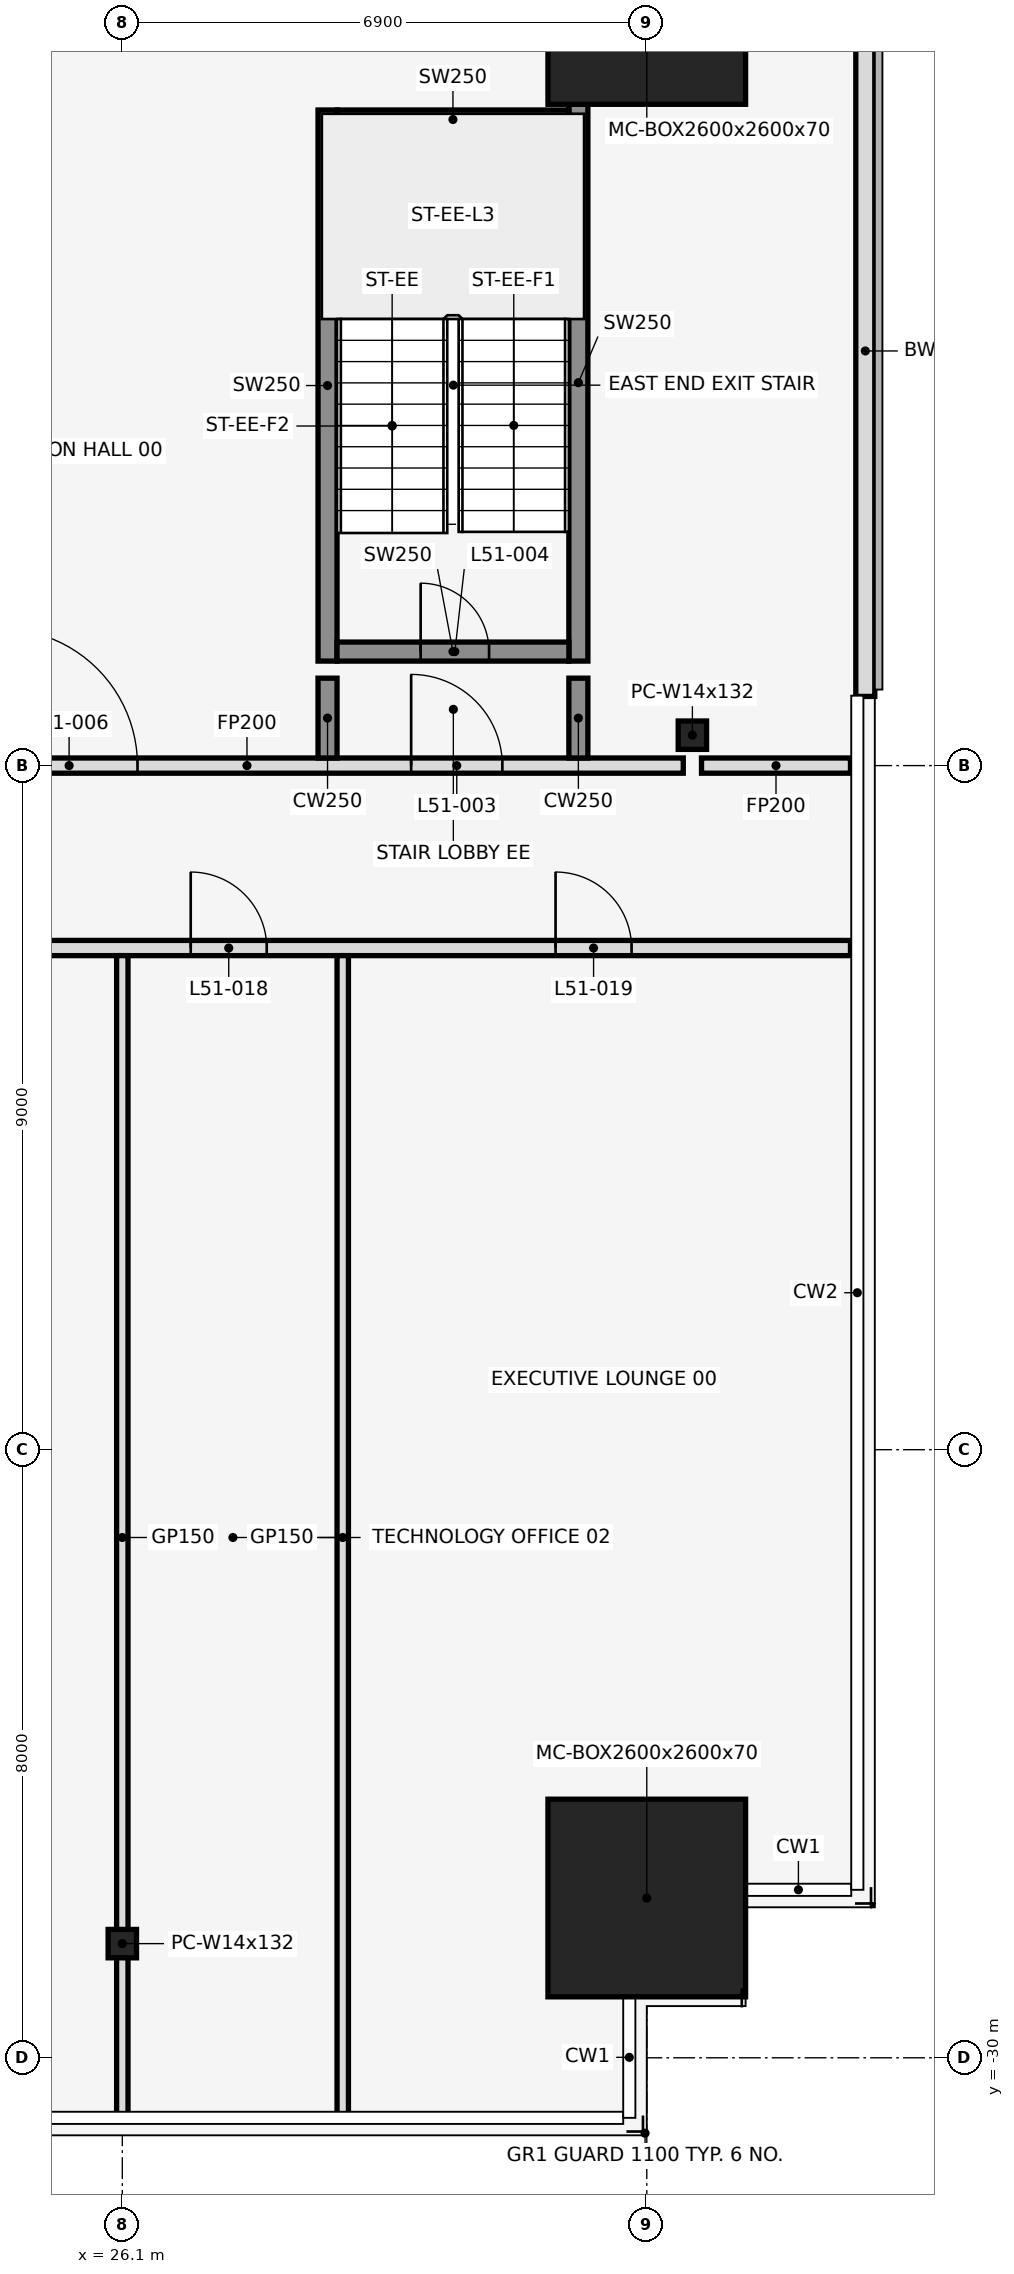
"""IFC4 building model, lengths in metres.
Left out: names, types, materials, properties, quantities, classifications, styles, units other than length and angle.
Written with IfcOpenShell. Run it as: python <this file> out.ifc"""

import sys

from ifc_helpers import new_model, si_unit, direction, frame, frame_2d, origin, origin_2d, place, context, subcontext, project, spatial, rectangle, hollow_rectangle, i_section, extrude, element, fill, save


model = new_model("IFC4")
c1 = context("Model", 3, precision=1e-05, world=origin(), true_north=direction((0.0, 1.0)))
c2 = subcontext(c1, "Body", "Model", "MODEL_VIEW")
j1 = project(units=[si_unit("LENGTHUNIT", "METRE"), si_unit("PLANEANGLEUNIT", "RADIAN")], contexts=[c1])
p1 = place(None, origin())
s1 = spatial("IfcSite", under=j1, at=p1, CompositionType="ELEMENT")
p2 = place(p1, origin())
s2 = spatial("IfcBuilding", under=s1, at=p2, CompositionType="ELEMENT")
p3 = place(p2, frame((0.0, 0.0, 227.8)))
s3 = spatial("IfcBuildingStorey", under=s2, at=p3, CompositionType="ELEMENT", Elevation=227.8)
p4 = place(p3, frame((26.1, -28.498, 0.0), z_axis=(0.0, 0.0, 1.0), x_axis=(1.0, 0.0, 0.0)))
e1 = element("IfcColumn", 1, at=p4, inside=s3, PredefinedType="COLUMN", context=c2, shape_type="SweptSolid", body=[
    extrude(i_section(OverallWidth=0.373, OverallDepth=0.373, WebThickness=0.016, FlangeThickness=0.026, at=origin_2d()), origin(), (0.0, 0.0, 1.0), 4.1),
])
for number, where, z_axis, x_axis in (
    (2, (33.0, -27.898, 0.0), (0.0, 0.0, 1.0), (1.0, 0.0, 0.0)),
    (3, (33.0, -3.0, 0.0), (0.0, 0.0, 1.0), (1.0, 0.0, 0.0)),
):
    element("IfcColumn", number, at=place(p3, frame(where, z_axis=z_axis, x_axis=x_axis)), inside=s3, PredefinedType="COLUMN", context=c2, shape_type="SweptSolid", body=[
        extrude(hollow_rectangle(XDim=2.6, YDim=2.6, WallThickness=0.07, at=origin_2d()), origin(), (0.0, 0.0, 1.0), 4.1),
    ])
p5 = place(p3, frame((33.6, -12.6, 0.0), z_axis=(0.0, 0.0, 1.0), x_axis=(1.0, 0.0, 0.0)))
e4 = element("IfcColumn", 4, at=p5, inside=s3, PredefinedType="COLUMN", context=c2, shape_type="SweptSolid", body=[
    extrude(i_section(OverallWidth=0.373, OverallDepth=0.373, WebThickness=0.016, FlangeThickness=0.026, at=origin_2d()), origin(), (0.0, 0.0, 1.0), 4.1),
])
p6 = place(p3, frame((35.875, -12.09, 0.0), z_axis=(0.0, 0.0, 1.0), x_axis=(0.0, 1.0, 0.0)))
e5 = element("IfcWall", 5, at=p6, inside=s3, PredefinedType="STANDARD", context=c2, shape_type="SweptSolid", body=[
    extrude(rectangle(XDim=9.09, YDim=0.25, at=frame_2d((4.545, 0.0))), origin(), (0.0, 0.0, 1.0), 3.95),
])
p7 = place(p3, frame((28.8, -11.625, 0.0), z_axis=(0.0, 0.0, 1.0), x_axis=(0.0, 1.0, 0.0)))
e6 = element("IfcWall", 6, at=p7, inside=s3, PredefinedType="SHEAR", context=c2, shape_type="SweptSolid", body=[
    extrude(rectangle(XDim=7.25, YDim=0.25, at=frame_2d((3.625, 0.0))), origin(), (0.0, 0.0, 1.0), 4.1),
])
p8 = place(p3, frame((32.1, -11.625, 0.0), z_axis=(0.0, 0.0, 1.0), x_axis=(0.0, 1.0, 0.0)))
e7 = element("IfcWall", 7, at=p8, inside=s3, PredefinedType="SHEAR", context=c2, shape_type="SweptSolid", body=[
    extrude(rectangle(XDim=7.325, YDim=0.25, at=frame_2d((3.663, 0.0))), origin(), (0.0, 0.0, 1.0), 4.1),
])
p9 = place(p3, frame((28.925, -11.5, 0.0), z_axis=(0.0, 0.0, 1.0), x_axis=(1.0, 0.0, 0.0)))
e8 = element("IfcWall", 8, at=p9, inside=s3, PredefinedType="SHEAR", context=c2, shape_type="SweptSolid", body=[
    extrude(rectangle(XDim=3.05, YDim=0.25, at=frame_2d((1.525, 0.0))), origin(), (0.0, 0.0, 1.0), 4.1),
])
p10 = place(p9, frame((1.1, 0.0, 0.0)))
e9 = element("IfcOpeningElement", 9, at=p10, cuts=e8, PredefinedType="OPENING", context=c2, shape_type="SweptSolid", body=[
    extrude(rectangle(XDim=0.9, YDim=2.1, at=frame_2d((0.45, 1.05))), frame((0.0, 0.137, 0.0), z_axis=(0.0, -1.0, 0.0), x_axis=(1.0, 0.0, 0.0)), (0.0, 0.0, 1.0), 0.274),
])
p11 = place(p3, frame((28.925, -4.5, 0.0), z_axis=(0.0, 0.0, 1.0), x_axis=(1.0, 0.0, 0.0)))
e10 = element("IfcWall", 10, at=p11, inside=s3, PredefinedType="SHEAR", context=c2, shape_type="SweptSolid", body=[
    extrude(rectangle(XDim=3.05, YDim=0.25, at=frame_2d((1.525, 0.0))), origin(), (0.0, 0.0, 1.0), 4.1),
])
p12 = place(p3, frame((-35.68, -15.4, 0.0), z_axis=(0.0, 0.0, 1.0), x_axis=(1.0, 0.0, 0.0)))
e11 = element("IfcWall", 11, at=p12, inside=s3, PredefinedType="PARTITIONING", context=c2, shape_type="SweptSolid", body=[
    extrude(rectangle(XDim=71.36, YDim=0.2, at=frame_2d((35.68, 0.0))), origin(), (0.0, 0.0, 1.0), 2.84),
])
p13 = place(p12, frame((3.9, 0.0, 0.0)))
e12 = element("IfcOpeningElement", 12, at=p13, cuts=e11, PredefinedType="OPENING", context=c2, shape_type="SweptSolid", body=[
    extrude(rectangle(XDim=1.8, YDim=2.1, at=frame_2d((0.9, 1.05))), frame((0.0, 0.112, 0.0), z_axis=(0.0, -1.0, 0.0), x_axis=(1.0, 0.0, 0.0)), (0.0, 0.0, 1.0), 0.224),
])
p14 = place(p12, frame((13.48, 0.0, 0.0)))
e13 = element("IfcOpeningElement", 13, at=p14, cuts=e11, PredefinedType="OPENING", context=c2, shape_type="SweptSolid", body=[
    extrude(rectangle(XDim=0.9, YDim=2.1, at=frame_2d((0.45, 1.05))), frame((0.0, 0.112, 0.0), z_axis=(0.0, -1.0, 0.0), x_axis=(1.0, 0.0, 0.0)), (0.0, 0.0, 1.0), 0.224),
])
p15 = place(p12, frame((21.68, 0.0, 0.0)))
e14 = element("IfcOpeningElement", 14, at=p15, cuts=e11, PredefinedType="OPENING", context=c2, shape_type="SweptSolid", body=[
    extrude(rectangle(XDim=1.8, YDim=2.1, at=frame_2d((0.9, 1.05))), frame((0.0, 0.112, 0.0), z_axis=(0.0, -1.0, 0.0), x_axis=(1.0, 0.0, 0.0)), (0.0, 0.0, 1.0), 0.224),
])
p16 = place(p12, frame((29.38, 0.0, 0.0)))
e15 = element("IfcOpeningElement", 15, at=p16, cuts=e11, PredefinedType="OPENING", context=c2, shape_type="SweptSolid", body=[
    extrude(rectangle(XDim=1.0, YDim=2.1, at=frame_2d((0.5, 1.05))), frame((0.0, 0.112, 0.0), z_axis=(0.0, -1.0, 0.0), x_axis=(1.0, 0.0, 0.0)), (0.0, 0.0, 1.0), 0.224),
])
p17 = place(p12, frame((35.18, 0.0, 0.0)))
e16 = element("IfcOpeningElement", 16, at=p17, cuts=e11, PredefinedType="OPENING", context=c2, shape_type="SweptSolid", body=[
    extrude(rectangle(XDim=1.0, YDim=2.1, at=frame_2d((0.5, 1.05))), frame((0.0, 0.112, 0.0), z_axis=(0.0, -1.0, 0.0), x_axis=(1.0, 0.0, 0.0)), (0.0, 0.0, 1.0), 0.224),
])
p18 = place(p12, frame((41.98, 0.0, 0.0)))
e17 = element("IfcOpeningElement", 17, at=p18, cuts=e11, PredefinedType="OPENING", context=c2, shape_type="SweptSolid", body=[
    extrude(rectangle(XDim=1.8, YDim=2.1, at=frame_2d((0.9, 1.05))), frame((0.0, 0.112, 0.0), z_axis=(0.0, -1.0, 0.0), x_axis=(1.0, 0.0, 0.0)), (0.0, 0.0, 1.0), 0.224),
])
p19 = place(p12, frame((49.68, 0.0, 0.0)))
e18 = element("IfcOpeningElement", 18, at=p19, cuts=e11, PredefinedType="OPENING", context=c2, shape_type="SweptSolid", body=[
    extrude(rectangle(XDim=1.0, YDim=2.1, at=frame_2d((0.5, 1.05))), frame((0.0, 0.112, 0.0), z_axis=(0.0, -1.0, 0.0), x_axis=(1.0, 0.0, 0.0)), (0.0, 0.0, 1.0), 0.224),
])
p20 = place(p12, frame((56.98, 0.0, 0.0)))
e19 = element("IfcOpeningElement", 19, at=p20, cuts=e11, PredefinedType="OPENING", context=c2, shape_type="SweptSolid", body=[
    extrude(rectangle(XDim=1.0, YDim=2.1, at=frame_2d((0.5, 1.05))), frame((0.0, 0.112, 0.0), z_axis=(0.0, -1.0, 0.0), x_axis=(1.0, 0.0, 0.0)), (0.0, 0.0, 1.0), 0.224),
])
p21 = place(p12, frame((62.68, 0.0, 0.0)))
e20 = element("IfcOpeningElement", 20, at=p21, cuts=e11, PredefinedType="OPENING", context=c2, shape_type="SweptSolid", body=[
    extrude(rectangle(XDim=1.0, YDim=2.1, at=frame_2d((0.5, 1.05))), frame((0.0, 0.112, 0.0), z_axis=(0.0, -1.0, 0.0), x_axis=(1.0, 0.0, 0.0)), (0.0, 0.0, 1.0), 0.224),
])
p22 = place(p12, frame((67.48, 0.0, 0.0)))
e21 = element("IfcOpeningElement", 21, at=p22, cuts=e11, PredefinedType="OPENING", context=c2, shape_type="SweptSolid", body=[
    extrude(rectangle(XDim=1.0, YDim=2.1, at=frame_2d((0.5, 1.05))), frame((0.0, 0.112, 0.0), z_axis=(0.0, -1.0, 0.0), x_axis=(1.0, 0.0, 0.0)), (0.0, 0.0, 1.0), 0.224),
])
p23 = place(p3, frame((22.0, -13.0, 0.0), z_axis=(0.0, 0.0, 1.0), x_axis=(1.0, 0.0, 0.0)))
e22 = element("IfcWall", 22, at=p23, inside=s3, PredefinedType="PARTITIONING", context=c2, shape_type="SweptSolid", body=[
    extrude(rectangle(XDim=11.48, YDim=0.2, at=frame_2d((5.74, 0.0))), origin(), (0.0, 0.0, 1.0), 2.84),
])
p24 = place(p23, frame((7.9, 0.0, 0.0)))
e23 = element("IfcOpeningElement", 23, at=p24, cuts=e22, PredefinedType="OPENING", context=c2, shape_type="SweptSolid", body=[
    extrude(rectangle(XDim=1.2, YDim=2.1, at=frame_2d((0.6, 1.05))), frame((0.0, 0.112, 0.0), z_axis=(0.0, -1.0, 0.0), x_axis=(1.0, 0.0, 0.0)), (0.0, 0.0, 1.0), 0.224),
])
p25 = place(p23, frame((2.5, 0.0, 0.0)))
e24 = element("IfcOpeningElement", 24, at=p25, cuts=e22, PredefinedType="OPENING", context=c2, shape_type="SweptSolid", body=[
    extrude(rectangle(XDim=1.8, YDim=2.1, at=frame_2d((0.9, 1.05))), frame((0.0, 0.112, 0.0), z_axis=(0.0, -1.0, 0.0), x_axis=(1.0, 0.0, 0.0)), (0.0, 0.0, 1.0), 0.224),
])
p26 = place(p3, frame((33.72, -13.0, 0.0), z_axis=(0.0, 0.0, 1.0), x_axis=(1.0, 0.0, 0.0)))
e25 = element("IfcWall", 25, at=p26, inside=s3, PredefinedType="PARTITIONING", context=c2, shape_type="SweptSolid", body=[
    extrude(rectangle(XDim=1.96, YDim=0.2, at=frame_2d((0.98, 0.0))), origin(), (0.0, 0.0, 1.0), 2.84),
])
p27 = place(p3, frame((26.1, -30.81, 0.0), z_axis=(0.0, 0.0, 1.0), x_axis=(0.0, 1.0, 0.0)))
e26 = element("IfcWall", 26, at=p27, inside=s3, PredefinedType="PARTITIONING", context=c2, shape_type="SweptSolid", body=[
    extrude(rectangle(XDim=15.31, YDim=0.15, at=frame_2d((7.655, 0.0))), origin(), (0.0, 0.0, 1.0), 2.84),
])
p28 = place(p3, frame((28.8, -12.9, 0.0), z_axis=(0.0, 0.0, 1.0), x_axis=(0.0, 1.0, 0.0)))
e27 = element("IfcWall", 27, at=p28, inside=s3, PredefinedType="SHEAR", context=c2, shape_type="SweptSolid", body=[
    extrude(rectangle(XDim=1.05, YDim=0.25, at=frame_2d((0.525, 0.0))), origin(), (0.0, 0.0, 1.0), 4.1),
])
p29 = place(p3, frame((29.0, -30.81, 0.0), z_axis=(0.0, 0.0, 1.0), x_axis=(0.0, 1.0, 0.0)))
e28 = element("IfcWall", 28, at=p29, inside=s3, PredefinedType="PARTITIONING", context=c2, shape_type="SweptSolid", body=[
    extrude(rectangle(XDim=15.31, YDim=0.15, at=frame_2d((7.655, 0.0))), origin(), (0.0, 0.0, 1.0), 2.84),
])
p30 = place(p3, frame((32.1, -12.9, 0.0), z_axis=(0.0, 0.0, 1.0), x_axis=(0.0, 1.0, 0.0)))
e29 = element("IfcWall", 29, at=p30, inside=s3, PredefinedType="SHEAR", context=c2, shape_type="SweptSolid", body=[
    extrude(rectangle(XDim=1.05, YDim=0.25, at=frame_2d((0.525, 0.0))), origin(), (0.0, 0.0, 1.0), 4.1),
])
p31 = place(p24, origin())
e30 = element("IfcDoor", 30, at=p31, inside=s3, OperationType="SINGLE_SWING_RIGHT", PredefinedType="DOOR", context=c2, shape_type="SweptSolid", body=[
    extrude(rectangle(XDim=1.2, YDim=2.1, at=frame_2d((0.6, 1.05))), frame((0.0, 0.025, 0.0), z_axis=(0.0, -1.0, 0.0), x_axis=(1.0, 0.0, 0.0)), (0.0, 0.0, 1.0), 0.05),
])
fill(e23, e30)
p32 = place(p10, origin())
e31 = element("IfcDoor", 31, at=p32, inside=s3, OperationType="SINGLE_SWING_LEFT", PredefinedType="DOOR", context=c2, shape_type="SweptSolid", body=[
    extrude(rectangle(XDim=0.9, YDim=2.1, at=frame_2d((0.45, 1.05))), frame((0.0, 0.025, 0.0), z_axis=(0.0, -1.0, 0.0), x_axis=(1.0, 0.0, 0.0)), (0.0, 0.0, 1.0), 0.05),
])
fill(e9, e31)
p33 = place(p25, origin())
e32 = element("IfcDoor", 32, at=p33, inside=s3, OperationType="SINGLE_SWING_LEFT", PredefinedType="DOOR", context=c2, shape_type="SweptSolid", body=[
    extrude(rectangle(XDim=1.8, YDim=2.1, at=frame_2d((0.9, 1.05))), frame((0.0, 0.025, 0.0), z_axis=(0.0, -1.0, 0.0), x_axis=(1.0, 0.0, 0.0)), (0.0, 0.0, 1.0), 0.05),
])
fill(e24, e32)
p34 = place(p21, frame((1.0, 0.0, 0.0), z_axis=(0.0, 0.0, 1.0), x_axis=(-1.0, 0.0, 0.0)))
e33 = element("IfcDoor", 33, at=p34, inside=s3, OperationType="SINGLE_SWING_RIGHT", PredefinedType="DOOR", context=c2, shape_type="SweptSolid", body=[
    extrude(rectangle(XDim=1.0, YDim=2.1, at=frame_2d((0.5, 1.05))), frame((0.0, 0.025, 0.0), z_axis=(0.0, -1.0, 0.0), x_axis=(1.0, 0.0, 0.0)), (0.0, 0.0, 1.0), 0.05),
])
fill(e20, e33)
p35 = place(p22, frame((1.0, 0.0, 0.0), z_axis=(0.0, 0.0, 1.0), x_axis=(-1.0, 0.0, 0.0)))
e34 = element("IfcDoor", 34, at=p35, inside=s3, OperationType="SINGLE_SWING_LEFT", PredefinedType="DOOR", context=c2, shape_type="SweptSolid", body=[
    extrude(rectangle(XDim=1.0, YDim=2.1, at=frame_2d((0.5, 1.05))), frame((0.0, 0.025, 0.0), z_axis=(0.0, -1.0, 0.0), x_axis=(1.0, 0.0, 0.0)), (0.0, 0.0, 1.0), 0.05),
])
fill(e21, e34)
save(model, sys.argv[1])
